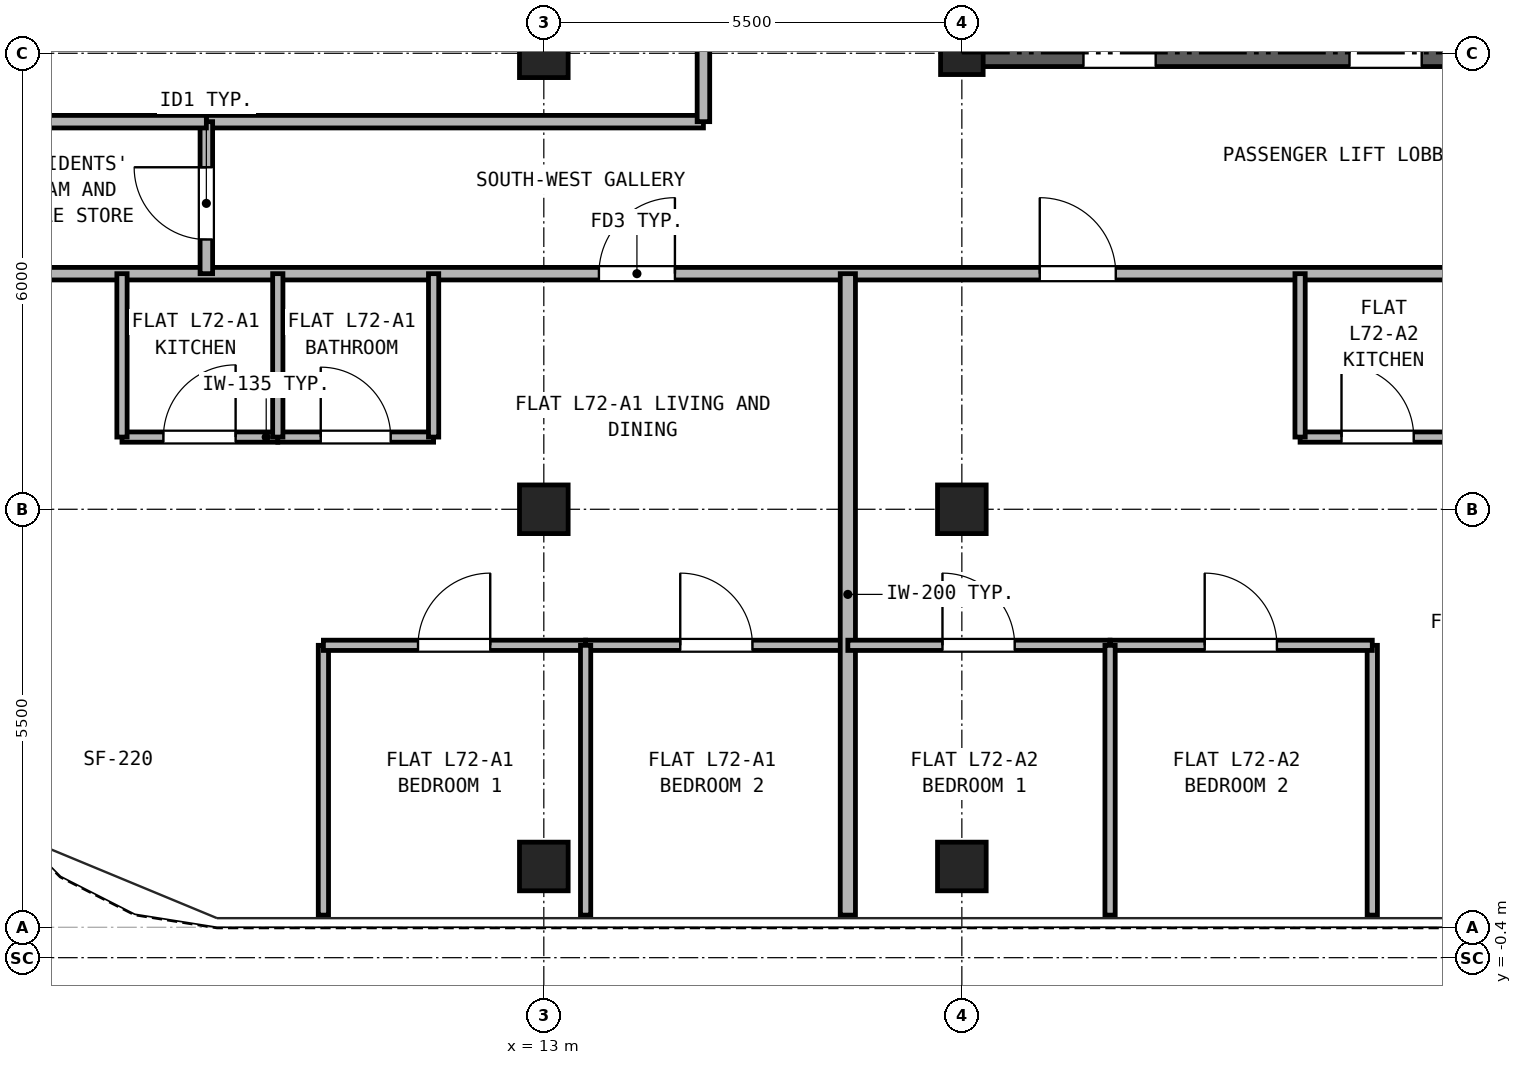
"""IFC4 building model, lengths in metres.
Left out: names, types, materials, properties, quantities, classifications, styles, units other than length and angle.
Written with IfcOpenShell. Run it as: python <this file> out.ifc"""

import sys

from ifc_helpers import new_model, si_unit, direction, frame, frame_2d, origin, origin_2d, place, context, subcontext, project, spatial, rectangle, hollow_rectangle, extrude, source, transform, mapped, element, fill, save


model = new_model("IFC4")
c1 = context("Model", 3, precision=1e-05, world=origin(), true_north=direction((0.0, 1.0)))
c2 = subcontext(c1, "Body", "Model", "MODEL_VIEW")
j1 = project(units=[si_unit("LENGTHUNIT", "METRE"), si_unit("PLANEANGLEUNIT", "RADIAN")], contexts=[c1])
p1 = place(None, origin())
s1 = spatial("IfcSite", under=j1, at=p1, CompositionType="ELEMENT")
p2 = place(p1, origin())
s2 = spatial("IfcBuilding", under=s1, at=p2, CompositionType="ELEMENT")
p3 = place(p2, frame((0.0, 0.0, 252.1)))
s3 = spatial("IfcBuildingStorey", under=s2, at=p3, CompositionType="ELEMENT", Elevation=252.1)
m1 = source(origin(), c2, "Body", "SweptSolid", [
    extrude(hollow_rectangle(XDim=0.64, YDim=0.64, WallThickness=0.035, at=origin_2d()), origin(), (0.0, 0.0, 1.0), 2.98),
])
for number, where, z_axis, x_axis in (
    (1, (13.0, 0.8, 0.0), (0.0, 0.0, 1.0), (1.0, 0.0, 0.0)),
    (2, (18.5, 0.8, 0.0), (0.0, 0.0, 1.0), (1.0, 0.0, 0.0)),
    (3, (13.0, 5.5, 0.0), (0.0, 0.0, 1.0), (1.0, 0.0, 0.0)),
    (4, (13.0, 11.5, 0.0), (0.0, 0.0, 1.0), (1.0, 0.0, 0.0)),
    (5, (18.5, 5.5, 0.0), (0.0, 0.0, 1.0), (1.0, 0.0, 0.0)),
):
    element("IfcColumn", number, at=place(p3, frame(where, z_axis=z_axis, x_axis=x_axis)), inside=s3, PredefinedType="COLUMN", context=c2, shape_type="MappedRepresentation", body=[
        mapped(m1, transform((0.0, 0.0, 0.0), x_axis=(1.0, 0.0, 0.0), y_axis=(0.0, 1.0, 0.0), z_axis=(0.0, 0.0, 1.0), scale=1.0)),
    ])
m2 = source(origin(), c2, "Body", "SweptSolid", [
    extrude(hollow_rectangle(XDim=0.56, YDim=0.56, WallThickness=0.03, at=origin_2d()), origin(), (0.0, 0.0, 1.0), 2.98),
])
p4 = place(p3, frame((18.5, 11.5, 0.0), z_axis=(0.0, 0.0, 1.0), x_axis=(1.0, 0.0, 0.0)))
e6 = element("IfcColumn", 6, at=p4, inside=s3, PredefinedType="COLUMN", context=c2, shape_type="MappedRepresentation", body=[
    mapped(m2, transform((0.0, 0.0, 0.0), x_axis=(1.0, 0.0, 0.0), y_axis=(0.0, 1.0, 0.0), z_axis=(0.0, 0.0, 1.0), scale=1.0)),
])
p5 = place(p3, frame((18.325, 11.5, 0.0), z_axis=(0.0, 0.0, 1.0), x_axis=(1.0, 0.0, 0.0)))
e7 = element("IfcWall", 7, at=p5, inside=s3, PredefinedType="SHEAR", context=c2, shape_type="SweptSolid", body=[
    extrude(rectangle(XDim=10.35, YDim=0.35, at=frame_2d((5.175, 0.0))), origin(), (0.0, 0.0, 1.0), 2.98),
])
p6 = place(p5, frame((1.775, 0.0, 0.0)))
e8 = element("IfcOpeningElement", 8, at=p6, cuts=e7, PredefinedType="OPENING", context=c2, shape_type="SweptSolid", body=[
    extrude(rectangle(XDim=0.95, YDim=2.15, at=frame_2d((0.475, 1.075))), frame((0.0, 0.185, 0.0), z_axis=(0.0, -1.0, 0.0), x_axis=(1.0, 0.0, 0.0)), (0.0, 0.0, 1.0), 0.37),
])
p7 = place(p5, frame((5.275, 0.0, 0.0)))
e9 = element("IfcOpeningElement", 9, at=p7, cuts=e7, PredefinedType="OPENING", context=c2, shape_type="SweptSolid", body=[
    extrude(rectangle(XDim=0.95, YDim=2.15, at=frame_2d((0.475, 1.075))), frame((0.0, 0.185, 0.0), z_axis=(0.0, -1.0, 0.0), x_axis=(1.0, 0.0, 0.0)), (0.0, 0.0, 1.0), 0.37),
])
p8 = place(p5, frame((8.175, 0.0, 0.0)))
e10 = element("IfcOpeningElement", 10, at=p8, cuts=e7, PredefinedType="OPENING", context=c2, shape_type="SweptSolid", body=[
    extrude(rectangle(XDim=1.1, YDim=2.25, at=frame_2d((0.55, 1.125))), frame((0.0, 0.185, 0.0), z_axis=(0.0, -1.0, 0.0), x_axis=(1.0, 0.0, 0.0)), (0.0, 0.0, 1.0), 0.37),
])
p9 = place(p3, frame((5.36, 8.6, 0.0), z_axis=(0.0, 0.0, 1.0), x_axis=(1.0, 0.0, 0.0)))
e11 = element("IfcWall", 11, at=p9, inside=s3, PredefinedType="PARTITIONING", context=c2, shape_type="SweptSolid", body=[
    extrude(rectangle(XDim=36.28, YDim=0.165, at=frame_2d((18.14, 0.0))), origin(), (0.0, 0.0, 1.0), 2.655),
])
p10 = place(p9, frame((8.365, 0.0, 0.0)))
e12 = element("IfcOpeningElement", 12, at=p10, cuts=e11, PredefinedType="OPENING", context=c2, shape_type="SweptSolid", body=[
    extrude(rectangle(XDim=1.0, YDim=2.15, at=frame_2d((0.5, 1.075))), frame((0.0, 0.093, 0.0), z_axis=(0.0, -1.0, 0.0), x_axis=(1.0, 0.0, 0.0)), (0.0, 0.0, 1.0), 0.185),
])
p11 = place(p9, frame((14.165, 0.0, 0.0)))
e13 = element("IfcOpeningElement", 13, at=p11, cuts=e11, PredefinedType="OPENING", context=c2, shape_type="SweptSolid", body=[
    extrude(rectangle(XDim=1.0, YDim=2.15, at=frame_2d((0.5, 1.075))), frame((0.0, 0.093, 0.0), z_axis=(0.0, -1.0, 0.0), x_axis=(1.0, 0.0, 0.0)), (0.0, 0.0, 1.0), 0.185),
])
p12 = place(p9, frame((26.415, 0.0, 0.0)))
e14 = element("IfcOpeningElement", 14, at=p12, cuts=e11, PredefinedType="OPENING", context=c2, shape_type="SweptSolid", body=[
    extrude(rectangle(XDim=1.0, YDim=2.15, at=frame_2d((0.5, 1.075))), frame((0.0, 0.093, 0.0), z_axis=(0.0, -1.0, 0.0), x_axis=(1.0, 0.0, 0.0)), (0.0, 0.0, 1.0), 0.185),
])
p13 = place(p3, frame((8.56, 10.6, 0.0), z_axis=(0.0, 0.0, 1.0), x_axis=(1.0, 0.0, 0.0)))
e15 = element("IfcWall", 15, at=p13, inside=s3, PredefinedType="PARTITIONING", context=c2, shape_type="SweptSolid", body=[
    extrude(rectangle(XDim=6.54, YDim=0.165, at=frame_2d((3.27, 0.0))), origin(), (0.0, 0.0, 1.0), 2.98),
])
p14 = place(p3, frame((8.56, 8.6, 0.0), z_axis=(0.0, 0.0, 1.0), x_axis=(0.0, 1.0, 0.0)))
e16 = element("IfcWall", 16, at=p14, inside=s3, PredefinedType="PARTITIONING", context=c2, shape_type="SweptSolid", body=[
    extrude(rectangle(XDim=2.0, YDim=0.165, at=frame_2d((1.0, 0.0))), origin(), (0.0, 0.0, 1.0), 2.98),
])
p15 = place(p14, frame((0.45, 0.0, 0.0)))
e17 = element("IfcOpeningElement", 17, at=p15, cuts=e16, PredefinedType="OPENING", context=c2, shape_type="SweptSolid", body=[
    extrude(rectangle(XDim=0.95, YDim=2.15, at=frame_2d((0.475, 1.075))), frame((0.0, 0.093, 0.0), z_axis=(0.0, -1.0, 0.0), x_axis=(1.0, 0.0, 0.0)), (0.0, 0.0, 1.0), 0.185),
])
p16 = place(p3, frame((15.1, 10.6, 0.0), z_axis=(0.0, 0.0, 1.0), x_axis=(0.0, 1.0, 0.0)))
e18 = element("IfcWall", 18, at=p16, inside=s3, PredefinedType="PARTITIONING", context=c2, shape_type="SweptSolid", body=[
    extrude(rectangle(XDim=24.54, YDim=0.165, at=frame_2d((12.27, 0.0))), origin(), (0.0, 0.0, 1.0), 2.98),
])
p17 = place(p16, frame((3.45, 0.0, 0.0)))
e19 = element("IfcOpeningElement", 19, at=p17, cuts=e18, PredefinedType="OPENING", context=c2, shape_type="SweptSolid", body=[
    extrude(rectangle(XDim=0.95, YDim=2.15, at=frame_2d((0.475, 1.075))), frame((0.0, 0.093, 0.0), z_axis=(0.0, -1.0, 0.0), x_axis=(1.0, 0.0, 0.0)), (0.0, 0.0, 1.0), 0.185),
])
p18 = place(p16, frame((10.9, 0.0, 0.0)))
e20 = element("IfcOpeningElement", 20, at=p18, cuts=e18, PredefinedType="OPENING", context=c2, shape_type="SweptSolid", body=[
    extrude(rectangle(XDim=0.95, YDim=2.15, at=frame_2d((0.475, 1.075))), frame((0.0, 0.093, 0.0), z_axis=(0.0, -1.0, 0.0), x_axis=(1.0, 0.0, 0.0)), (0.0, 0.0, 1.0), 0.185),
])
p19 = place(p16, frame((16.75, 0.0, 0.0)))
e21 = element("IfcOpeningElement", 21, at=p19, cuts=e18, PredefinedType="OPENING", context=c2, shape_type="SweptSolid", body=[
    extrude(rectangle(XDim=0.95, YDim=2.15, at=frame_2d((0.475, 1.075))), frame((0.0, 0.093, 0.0), z_axis=(0.0, -1.0, 0.0), x_axis=(1.0, 0.0, 0.0)), (0.0, 0.0, 1.0), 0.185),
])
p20 = place(p16, frame((20.0, 0.0, 0.0)))
e22 = element("IfcOpeningElement", 22, at=p20, cuts=e18, PredefinedType="OPENING", context=c2, shape_type="SweptSolid", body=[
    extrude(rectangle(XDim=0.92, YDim=2.1, at=frame_2d((0.46, 1.05))), frame((0.0, 0.093, 0.0), z_axis=(0.0, -1.0, 0.0), x_axis=(1.0, 0.0, 0.0)), (0.0, 0.0, 1.0), 0.185),
])
p21 = place(p3, frame((7.45, 6.45, 0.0), z_axis=(0.0, 0.0, 1.0), x_axis=(1.0, 0.0, 0.0)))
e23 = element("IfcWall", 23, at=p21, inside=s3, PredefinedType="PARTITIONING", context=c2, shape_type="SweptSolid", body=[
    extrude(rectangle(XDim=2.05, YDim=0.135, at=frame_2d((1.025, 0.0))), origin(), (0.0, 0.0, 1.0), 2.98),
])
p22 = place(p21, frame((0.545, 0.0, 0.0)))
e24 = element("IfcOpeningElement", 24, at=p22, cuts=e23, PredefinedType="OPENING", context=c2, shape_type="SweptSolid", body=[
    extrude(rectangle(XDim=0.95, YDim=2.15, at=frame_2d((0.475, 1.075))), frame((0.0, 0.077, 0.0), z_axis=(0.0, -1.0, 0.0), x_axis=(1.0, 0.0, 0.0)), (0.0, 0.0, 1.0), 0.155),
])
p23 = place(p3, frame((9.5, 6.45, 0.0), z_axis=(0.0, 0.0, 1.0), x_axis=(1.0, 0.0, 0.0)))
e25 = element("IfcWall", 25, at=p23, inside=s3, PredefinedType="PARTITIONING", context=c2, shape_type="SweptSolid", body=[
    extrude(rectangle(XDim=2.05, YDim=0.135, at=frame_2d((1.025, 0.0))), origin(), (0.0, 0.0, 1.0), 2.98),
])
p24 = place(p23, frame((0.565, 0.0, 0.0)))
e26 = element("IfcOpeningElement", 26, at=p24, cuts=e25, PredefinedType="OPENING", context=c2, shape_type="SweptSolid", body=[
    extrude(rectangle(XDim=0.92, YDim=2.1, at=frame_2d((0.46, 1.05))), frame((0.0, 0.077, 0.0), z_axis=(0.0, -1.0, 0.0), x_axis=(1.0, 0.0, 0.0)), (0.0, 0.0, 1.0), 0.155),
])
for number, where, z_axis, x_axis in (
    (27, (7.45, 6.45, 0.0), (0.0, 0.0, 1.0), (0.0, 1.0, 0.0)),
    (28, (9.5, 6.45, 0.0), (0.0, 0.0, 1.0), (0.0, 1.0, 0.0)),
    (29, (11.55, 6.45, 0.0), (0.0, 0.0, 1.0), (0.0, 1.0, 0.0)),
):
    element("IfcWall", number, at=place(p3, frame(where, z_axis=z_axis, x_axis=x_axis)), inside=s3, PredefinedType="PARTITIONING", context=c2, shape_type="SweptSolid", body=[
        extrude(rectangle(XDim=2.15, YDim=0.135, at=frame_2d((1.075, 0.0))), origin(), (0.0, 0.0, 1.0), 2.98),
    ])
p25 = place(p3, frame((10.1, 0.16, 0.0), z_axis=(0.0, 0.0, 1.0), x_axis=(0.0, 1.0, 0.0)))
e30 = element("IfcWall", 30, at=p25, inside=s3, PredefinedType="PARTITIONING", context=c2, shape_type="SweptSolid", body=[
    extrude(rectangle(XDim=3.55, YDim=0.135, at=frame_2d((1.775, 0.0))), origin(), (0.0, 0.0, 1.0), 2.98),
])
p26 = place(p3, frame((10.1, 3.71, 0.0), z_axis=(0.0, 0.0, 1.0), x_axis=(1.0, 0.0, 0.0)))
e31 = element("IfcWall", 31, at=p26, inside=s3, PredefinedType="PARTITIONING", context=c2, shape_type="SweptSolid", body=[
    extrude(rectangle(XDim=3.45, YDim=0.135, at=frame_2d((1.725, 0.0))), origin(), (0.0, 0.0, 1.0), 2.98),
])
p27 = place(p26, frame((1.245, 0.0, 0.0)))
e32 = element("IfcOpeningElement", 32, at=p27, cuts=e31, PredefinedType="OPENING", context=c2, shape_type="SweptSolid", body=[
    extrude(rectangle(XDim=0.95, YDim=2.15, at=frame_2d((0.475, 1.075))), frame((0.0, 0.077, 0.0), z_axis=(0.0, -1.0, 0.0), x_axis=(1.0, 0.0, 0.0)), (0.0, 0.0, 1.0), 0.155),
])
p28 = place(p3, frame((13.55, 3.71, 0.0), z_axis=(0.0, 0.0, 1.0), x_axis=(1.0, 0.0, 0.0)))
e33 = element("IfcWall", 33, at=p28, inside=s3, PredefinedType="PARTITIONING", context=c2, shape_type="SweptSolid", body=[
    extrude(rectangle(XDim=3.45, YDim=0.135, at=frame_2d((1.725, 0.0))), origin(), (0.0, 0.0, 1.0), 2.98),
])
p29 = place(p28, frame((1.245, 0.0, 0.0)))
e34 = element("IfcOpeningElement", 34, at=p29, cuts=e33, PredefinedType="OPENING", context=c2, shape_type="SweptSolid", body=[
    extrude(rectangle(XDim=0.95, YDim=2.15, at=frame_2d((0.475, 1.075))), frame((0.0, 0.077, 0.0), z_axis=(0.0, -1.0, 0.0), x_axis=(1.0, 0.0, 0.0)), (0.0, 0.0, 1.0), 0.155),
])
p30 = place(p3, frame((13.55, 0.16, 0.0), z_axis=(0.0, 0.0, 1.0), x_axis=(0.0, 1.0, 0.0)))
e35 = element("IfcWall", 35, at=p30, inside=s3, PredefinedType="PARTITIONING", context=c2, shape_type="SweptSolid", body=[
    extrude(rectangle(XDim=3.55, YDim=0.135, at=frame_2d((1.775, 0.0))), origin(), (0.0, 0.0, 1.0), 2.98),
])
p31 = place(p3, frame((17.0, 0.16, 0.0), z_axis=(0.0, 0.0, 1.0), x_axis=(0.0, 1.0, 0.0)))
e36 = element("IfcWall", 36, at=p31, inside=s3, PredefinedType="PARTITIONING", context=c2, shape_type="SweptSolid", body=[
    extrude(rectangle(XDim=8.44, YDim=0.2, at=frame_2d((4.22, 0.0))), origin(), (0.0, 0.0, 1.0), 2.98),
])
p32 = place(p3, frame((22.95, 6.45, 0.0), z_axis=(0.0, 0.0, 1.0), x_axis=(1.0, 0.0, 0.0)))
e37 = element("IfcWall", 37, at=p32, inside=s3, PredefinedType="PARTITIONING", context=c2, shape_type="SweptSolid", body=[
    extrude(rectangle(XDim=2.05, YDim=0.135, at=frame_2d((1.025, 0.0))), origin(), (0.0, 0.0, 1.0), 2.98),
])
p33 = place(p32, frame((0.545, 0.0, 0.0)))
e38 = element("IfcOpeningElement", 38, at=p33, cuts=e37, PredefinedType="OPENING", context=c2, shape_type="SweptSolid", body=[
    extrude(rectangle(XDim=0.95, YDim=2.15, at=frame_2d((0.475, 1.075))), frame((0.0, 0.077, 0.0), z_axis=(0.0, -1.0, 0.0), x_axis=(1.0, 0.0, 0.0)), (0.0, 0.0, 1.0), 0.155),
])
p34 = place(p3, frame((22.95, 6.45, 0.0), z_axis=(0.0, 0.0, 1.0), x_axis=(0.0, 1.0, 0.0)))
e39 = element("IfcWall", 39, at=p34, inside=s3, PredefinedType="PARTITIONING", context=c2, shape_type="SweptSolid", body=[
    extrude(rectangle(XDim=2.15, YDim=0.135, at=frame_2d((1.075, 0.0))), origin(), (0.0, 0.0, 1.0), 2.98),
])
p35 = place(p3, frame((23.9, 0.16, 0.0), z_axis=(0.0, 0.0, 1.0), x_axis=(0.0, 1.0, 0.0)))
e40 = element("IfcWall", 40, at=p35, inside=s3, PredefinedType="PARTITIONING", context=c2, shape_type="SweptSolid", body=[
    extrude(rectangle(XDim=3.55, YDim=0.135, at=frame_2d((1.775, 0.0))), origin(), (0.0, 0.0, 1.0), 2.98),
])
p36 = place(p3, frame((17.0, 3.71, 0.0), z_axis=(0.0, 0.0, 1.0), x_axis=(1.0, 0.0, 0.0)))
e41 = element("IfcWall", 41, at=p36, inside=s3, PredefinedType="PARTITIONING", context=c2, shape_type="SweptSolid", body=[
    extrude(rectangle(XDim=3.45, YDim=0.135, at=frame_2d((1.725, 0.0))), origin(), (0.0, 0.0, 1.0), 2.98),
])
p37 = place(p36, frame((1.245, 0.0, 0.0)))
e42 = element("IfcOpeningElement", 42, at=p37, cuts=e41, PredefinedType="OPENING", context=c2, shape_type="SweptSolid", body=[
    extrude(rectangle(XDim=0.95, YDim=2.15, at=frame_2d((0.475, 1.075))), frame((0.0, 0.077, 0.0), z_axis=(0.0, -1.0, 0.0), x_axis=(1.0, 0.0, 0.0)), (0.0, 0.0, 1.0), 0.155),
])
p38 = place(p3, frame((20.45, 3.71, 0.0), z_axis=(0.0, 0.0, 1.0), x_axis=(1.0, 0.0, 0.0)))
e43 = element("IfcWall", 43, at=p38, inside=s3, PredefinedType="PARTITIONING", context=c2, shape_type="SweptSolid", body=[
    extrude(rectangle(XDim=3.45, YDim=0.135, at=frame_2d((1.725, 0.0))), origin(), (0.0, 0.0, 1.0), 2.98),
])
p39 = place(p38, frame((1.245, 0.0, 0.0)))
e44 = element("IfcOpeningElement", 44, at=p39, cuts=e43, PredefinedType="OPENING", context=c2, shape_type="SweptSolid", body=[
    extrude(rectangle(XDim=0.95, YDim=2.15, at=frame_2d((0.475, 1.075))), frame((0.0, 0.077, 0.0), z_axis=(0.0, -1.0, 0.0), x_axis=(1.0, 0.0, 0.0)), (0.0, 0.0, 1.0), 0.155),
])
p40 = place(p3, frame((20.45, 0.16, 0.0), z_axis=(0.0, 0.0, 1.0), x_axis=(0.0, 1.0, 0.0)))
e45 = element("IfcWall", 45, at=p40, inside=s3, PredefinedType="PARTITIONING", context=c2, shape_type="SweptSolid", body=[
    extrude(rectangle(XDim=3.55, YDim=0.135, at=frame_2d((1.775, 0.0))), origin(), (0.0, 0.0, 1.0), 2.98),
])
p41 = place(p3, frame((5.36, 10.6, 0.0), z_axis=(0.0, 0.0, 1.0), x_axis=(1.0, 0.0, 0.0)))
e46 = element("IfcWall", 46, at=p41, inside=s3, PredefinedType="PARTITIONING", context=c2, shape_type="SweptSolid", body=[
    extrude(rectangle(XDim=3.2, YDim=0.165, at=frame_2d((1.6, 0.0))), origin(), (0.0, 0.0, 1.0), 2.98),
])
p42 = place(p6, frame((0.95, 0.0, 0.0), z_axis=(0.0, 0.0, 1.0), x_axis=(-1.0, 0.0, 0.0)))
e47 = element("IfcDoor", 47, at=p42, inside=s3, OperationType="SINGLE_SWING_LEFT", PredefinedType="DOOR", context=c2, shape_type="SweptSolid", body=[
    extrude(rectangle(XDim=0.95, YDim=2.15, at=frame_2d((0.475, 1.075))), frame((0.0, 0.025, 0.0), z_axis=(0.0, -1.0, 0.0), x_axis=(1.0, 0.0, 0.0)), (0.0, 0.0, 1.0), 0.05),
])
fill(e8, e47)
p43 = place(p7, frame((0.95, 0.0, 0.0), z_axis=(0.0, 0.0, 1.0), x_axis=(-1.0, 0.0, 0.0)))
e48 = element("IfcDoor", 48, at=p43, inside=s3, OperationType="SINGLE_SWING_LEFT", PredefinedType="DOOR", context=c2, shape_type="SweptSolid", body=[
    extrude(rectangle(XDim=0.95, YDim=2.15, at=frame_2d((0.475, 1.075))), frame((0.0, 0.025, 0.0), z_axis=(0.0, -1.0, 0.0), x_axis=(1.0, 0.0, 0.0)), (0.0, 0.0, 1.0), 0.05),
])
fill(e9, e48)
p44 = place(p22, origin())
e49 = element("IfcDoor", 49, at=p44, inside=s3, OperationType="SINGLE_SWING_RIGHT", PredefinedType="DOOR", context=c2, shape_type="SweptSolid", body=[
    extrude(rectangle(XDim=0.95, YDim=2.15, at=frame_2d((0.475, 1.075))), frame((0.0, 0.025, 0.0), z_axis=(0.0, -1.0, 0.0), x_axis=(1.0, 0.0, 0.0)), (0.0, 0.0, 1.0), 0.05),
])
fill(e24, e49)
p45 = place(p24, origin())
e50 = element("IfcDoor", 50, at=p45, inside=s3, OperationType="SINGLE_SWING_LEFT", PredefinedType="DOOR", context=c2, shape_type="SweptSolid", body=[
    extrude(rectangle(XDim=0.92, YDim=2.1, at=frame_2d((0.46, 1.05))), frame((0.0, 0.025, 0.0), z_axis=(0.0, -1.0, 0.0), x_axis=(1.0, 0.0, 0.0)), (0.0, 0.0, 1.0), 0.05),
])
fill(e26, e50)
p46 = place(p27, frame((0.95, 0.0, 0.0), z_axis=(0.0, 0.0, 1.0), x_axis=(-1.0, 0.0, 0.0)))
e51 = element("IfcDoor", 51, at=p46, inside=s3, OperationType="SINGLE_SWING_RIGHT", PredefinedType="DOOR", context=c2, shape_type="SweptSolid", body=[
    extrude(rectangle(XDim=0.95, YDim=2.15, at=frame_2d((0.475, 1.075))), frame((0.0, 0.025, 0.0), z_axis=(0.0, -1.0, 0.0), x_axis=(1.0, 0.0, 0.0)), (0.0, 0.0, 1.0), 0.05),
])
fill(e32, e51)
p47 = place(p29, frame((0.95, 0.0, 0.0), z_axis=(0.0, 0.0, 1.0), x_axis=(-1.0, 0.0, 0.0)))
e52 = element("IfcDoor", 52, at=p47, inside=s3, OperationType="SINGLE_SWING_LEFT", PredefinedType="DOOR", context=c2, shape_type="SweptSolid", body=[
    extrude(rectangle(XDim=0.95, YDim=2.15, at=frame_2d((0.475, 1.075))), frame((0.0, 0.025, 0.0), z_axis=(0.0, -1.0, 0.0), x_axis=(1.0, 0.0, 0.0)), (0.0, 0.0, 1.0), 0.05),
])
fill(e34, e52)
p48 = place(p10, frame((1.0, 0.0, 0.0), z_axis=(0.0, 0.0, 1.0), x_axis=(-1.0, 0.0, 0.0)))
e53 = element("IfcDoor", 53, at=p48, inside=s3, OperationType="SINGLE_SWING_RIGHT", PredefinedType="DOOR", context=c2, shape_type="SweptSolid", body=[
    extrude(rectangle(XDim=1.0, YDim=2.15, at=frame_2d((0.5, 1.075))), frame((0.0, 0.025, 0.0), z_axis=(0.0, -1.0, 0.0), x_axis=(1.0, 0.0, 0.0)), (0.0, 0.0, 1.0), 0.05),
])
fill(e12, e53)
p49 = place(p33, origin())
e54 = element("IfcDoor", 54, at=p49, inside=s3, OperationType="SINGLE_SWING_LEFT", PredefinedType="DOOR", context=c2, shape_type="SweptSolid", body=[
    extrude(rectangle(XDim=0.95, YDim=2.15, at=frame_2d((0.475, 1.075))), frame((0.0, 0.025, 0.0), z_axis=(0.0, -1.0, 0.0), x_axis=(1.0, 0.0, 0.0)), (0.0, 0.0, 1.0), 0.05),
])
fill(e38, e54)
p50 = place(p37, frame((0.95, 0.0, 0.0), z_axis=(0.0, 0.0, 1.0), x_axis=(-1.0, 0.0, 0.0)))
e55 = element("IfcDoor", 55, at=p50, inside=s3, OperationType="SINGLE_SWING_LEFT", PredefinedType="DOOR", context=c2, shape_type="SweptSolid", body=[
    extrude(rectangle(XDim=0.95, YDim=2.15, at=frame_2d((0.475, 1.075))), frame((0.0, 0.025, 0.0), z_axis=(0.0, -1.0, 0.0), x_axis=(1.0, 0.0, 0.0)), (0.0, 0.0, 1.0), 0.05),
])
fill(e42, e55)
p51 = place(p39, frame((0.95, 0.0, 0.0), z_axis=(0.0, 0.0, 1.0), x_axis=(-1.0, 0.0, 0.0)))
e56 = element("IfcDoor", 56, at=p51, inside=s3, OperationType="SINGLE_SWING_LEFT", PredefinedType="DOOR", context=c2, shape_type="SweptSolid", body=[
    extrude(rectangle(XDim=0.95, YDim=2.15, at=frame_2d((0.475, 1.075))), frame((0.0, 0.025, 0.0), z_axis=(0.0, -1.0, 0.0), x_axis=(1.0, 0.0, 0.0)), (0.0, 0.0, 1.0), 0.05),
])
fill(e44, e56)
p52 = place(p11, frame((1.0, 0.0, 0.0), z_axis=(0.0, 0.0, 1.0), x_axis=(-1.0, 0.0, 0.0)))
e57 = element("IfcDoor", 57, at=p52, inside=s3, OperationType="SINGLE_SWING_LEFT", PredefinedType="DOOR", context=c2, shape_type="SweptSolid", body=[
    extrude(rectangle(XDim=1.0, YDim=2.15, at=frame_2d((0.5, 1.075))), frame((0.0, 0.025, 0.0), z_axis=(0.0, -1.0, 0.0), x_axis=(1.0, 0.0, 0.0)), (0.0, 0.0, 1.0), 0.05),
])
fill(e13, e57)
p53 = place(p15, frame((0.95, 0.0, 0.0), z_axis=(0.0, 0.0, 1.0), x_axis=(-1.0, 0.0, 0.0)))
e58 = element("IfcDoor", 58, at=p53, inside=s3, OperationType="SINGLE_SWING_RIGHT", PredefinedType="DOOR", context=c2, shape_type="SweptSolid", body=[
    extrude(rectangle(XDim=0.95, YDim=2.15, at=frame_2d((0.475, 1.075))), frame((0.0, 0.025, 0.0), z_axis=(0.0, -1.0, 0.0), x_axis=(1.0, 0.0, 0.0)), (0.0, 0.0, 1.0), 0.05),
])
fill(e17, e58)
save(model, sys.argv[1])
